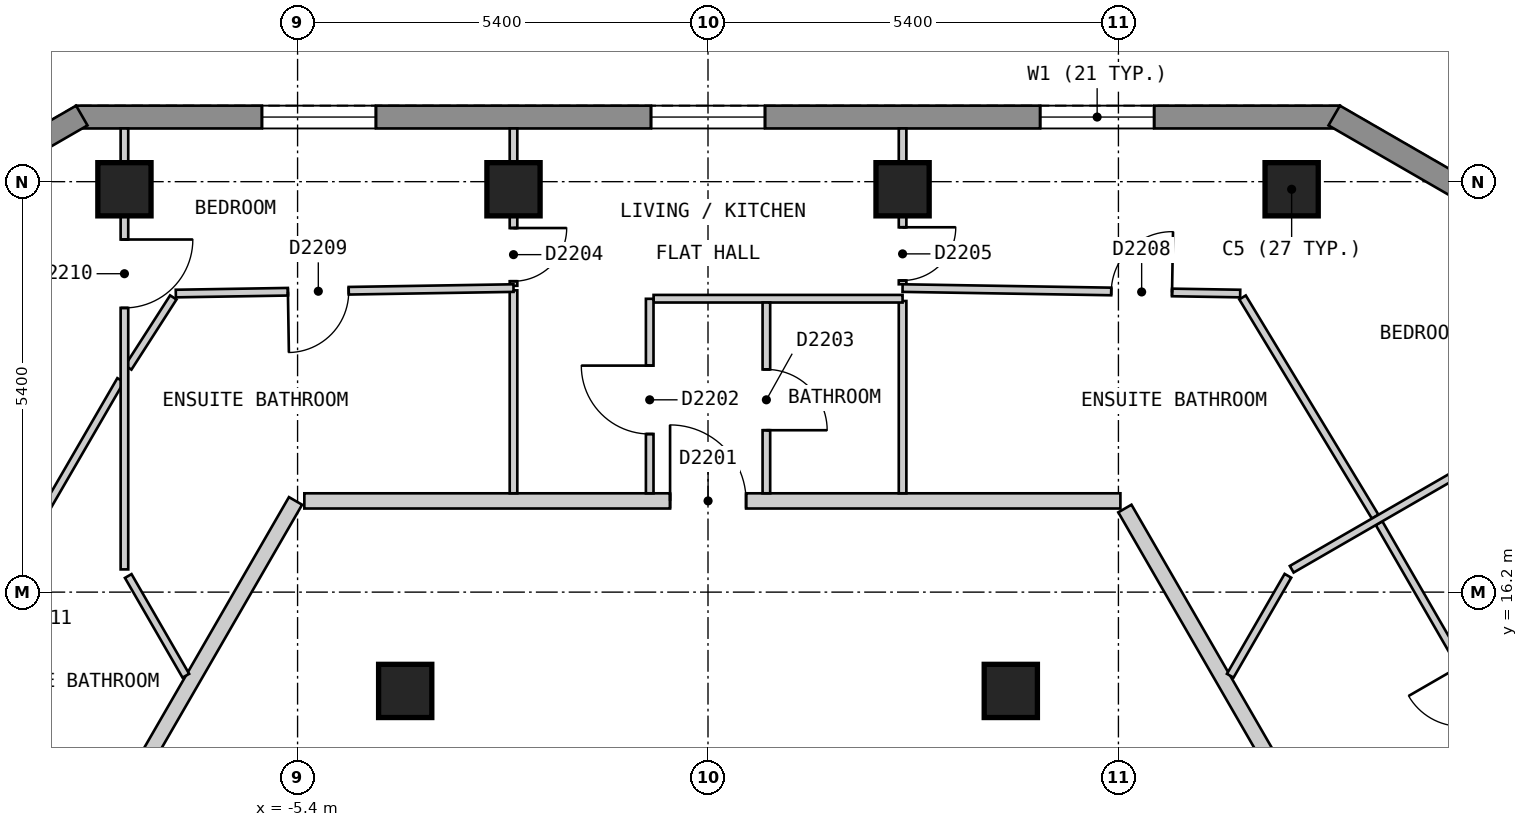
"""IFC4 building model, lengths in metres.
Left out: names, types, materials, properties, quantities, classifications, styles, units other than length and angle.
Written with IfcOpenShell. Run it as: python <this file> out.ifc"""

import sys

from ifc_helpers import new_model, si_unit, direction, frame, frame_2d, origin, origin_2d, place, context, subcontext, project, spatial, polyline, rectangle, outline, extrude, element, fill, save


model = new_model("IFC4")
c1 = context("Model", 3, precision=1e-05, world=origin(), true_north=direction((0.0, 1.0)))
c2 = subcontext(c1, "Body", "Model", "MODEL_VIEW")
j1 = project(units=[si_unit("LENGTHUNIT", "METRE"), si_unit("PLANEANGLEUNIT", "RADIAN")], contexts=[c1])
p1 = place(None, origin())
s1 = spatial("IfcSite", under=j1, at=p1, CompositionType="ELEMENT")
p2 = place(p1, origin())
s2 = spatial("IfcBuilding", under=s1, at=p2, CompositionType="ELEMENT")
p3 = place(p2, frame((0.0, 0.0, 235.8)))
s3 = spatial("IfcBuildingStorey", under=s2, at=p3, CompositionType="ELEMENT", Elevation=235.8)
for number, where, z_axis, x_axis in (
    (1, (7.679, 21.5, 0.0), (0.0, 0.0, 1.0), (-1.0, 0.0, 0.0)),
    (2, (2.56, 21.5, 0.0), (0.0, 0.0, 1.0), (-1.0, 0.0, 0.0)),
    (3, (-2.559, 21.5, 0.0), (0.0, 0.0, 1.0), (-1.0, 0.0, 0.0)),
    (4, (-7.678, 21.5, 0.0), (0.0, 0.0, 1.0), (-1.0, 0.0, 0.0)),
    (5, (3.984, 14.9, 0.0), (0.0, 0.0, 1.0), (1.0, 0.0, 0.0)),
    (6, (-3.984, 14.9, 0.0), (0.0, 0.0, 1.0), (1.0, 0.0, 0.0)),
):
    element("IfcColumn", number, at=place(p3, frame(where, z_axis=z_axis, x_axis=x_axis)), inside=s3, PredefinedType="COLUMN", context=c2, shape_type="SweptSolid", body=[
        extrude(rectangle(XDim=0.7, YDim=0.7, at=origin_2d()), origin(), (0.0, 0.0, 1.0), 3.0),
    ])
p4 = place(p3, frame((8.314, 22.45, 0.0), z_axis=(0.0, 0.0, 1.0), x_axis=(-1.0, 0.0, 0.0)))
e7 = element("IfcWall", 7, at=p4, inside=s3, PredefinedType="SOLIDWALL", context=c2, shape_type="SweptSolid", body=[
    extrude(outline(polyline([(0.0, -0.15), (16.628, -0.15), (16.548, 0.15), (0.08, 0.15), (0.0, -0.15)])), origin(), (0.0, 0.0, 1.0), 2.7),
])
p5 = place(p4, frame((2.444, 0.0, 0.15)))
e8 = element("IfcOpeningElement", 8, at=p5, cuts=e7, PredefinedType="OPENING", context=c2, shape_type="SweptSolid", body=[
    extrude(rectangle(XDim=1.5, YDim=2.1, at=frame_2d((0.75, 1.05))), frame((0.0, 0.16, 0.0), z_axis=(0.0, -1.0, 0.0), x_axis=(1.0, 0.0, 0.0)), (0.0, 0.0, 1.0), 0.32),
])
p6 = place(p4, frame((7.564, 0.0, 0.15)))
e9 = element("IfcOpeningElement", 9, at=p6, cuts=e7, PredefinedType="OPENING", context=c2, shape_type="SweptSolid", body=[
    extrude(rectangle(XDim=1.5, YDim=2.1, at=frame_2d((0.75, 1.05))), frame((0.0, 0.16, 0.0), z_axis=(0.0, -1.0, 0.0), x_axis=(1.0, 0.0, 0.0)), (0.0, 0.0, 1.0), 0.32),
])
p7 = place(p4, frame((12.683, 0.0, 0.15)))
e10 = element("IfcOpeningElement", 10, at=p7, cuts=e7, PredefinedType="OPENING", context=c2, shape_type="SweptSolid", body=[
    extrude(rectangle(XDim=1.5, YDim=2.1, at=frame_2d((0.75, 1.05))), frame((0.0, 0.16, 0.0), z_axis=(0.0, -1.0, 0.0), x_axis=(1.0, 0.0, 0.0)), (0.0, 0.0, 1.0), 0.32),
])
p8 = place(p3, frame((-8.239, 22.47, 0.0), z_axis=(0.0, 0.0, 1.0), x_axis=(-0.866022959057, -0.500004234368, 0.0)))
e11 = element("IfcWall", 11, at=p8, inside=s3, PredefinedType="SOLIDWALL", context=c2, shape_type="SweptSolid", body=[
    extrude(outline(polyline([(0.0, -0.15), (5.0, -0.15), (4.92, 0.15), (0.08, 0.15), (0.0, -0.15)])), origin(), (0.0, 0.0, 1.0), 2.7),
])
p9 = place(p8, frame((0.65, 0.0, 0.15)))
e12 = element("IfcOpeningElement", 12, at=p9, cuts=e11, PredefinedType="OPENING", context=c2, shape_type="SweptSolid", body=[
    extrude(rectangle(XDim=1.2, YDim=2.1, at=frame_2d((0.6, 1.05))), frame((0.0, 0.16, 0.0), z_axis=(0.0, -1.0, 0.0), x_axis=(1.0, 0.0, 0.0)), (0.0, 0.0, 1.0), 0.32),
])
p10 = place(p3, frame((12.569, 19.97, 0.0), z_axis=(0.0, 0.0, 1.0), x_axis=(-0.866022959057, 0.500004234368, 0.0)))
e13 = element("IfcWall", 13, at=p10, inside=s3, PredefinedType="SOLIDWALL", context=c2, shape_type="SweptSolid", body=[
    extrude(outline(polyline([(0.0, -0.15), (5.0, -0.15), (4.92, 0.15), (0.08, 0.15), (0.0, -0.15)])), origin(), (0.0, 0.0, 1.0), 2.7),
])
p11 = place(p10, frame((0.65, 0.0, 0.15)))
e14 = element("IfcOpeningElement", 14, at=p11, cuts=e13, PredefinedType="OPENING", context=c2, shape_type="SweptSolid", body=[
    extrude(rectangle(XDim=1.2, YDim=2.1, at=frame_2d((0.6, 1.05))), frame((0.0, 0.16, 0.0), z_axis=(0.0, -1.0, 0.0), x_axis=(1.0, 0.0, 0.0)), (0.0, 0.0, 1.0), 0.32),
])
p12 = place(p3, frame((5.485, 17.3, 0.0), z_axis=(0.0, 0.0, 1.0), x_axis=(0.500017221754, -0.866015460572, 0.0)))
e15 = element("IfcWall", 15, at=p12, inside=s3, PredefinedType="PARTITIONING", context=c2, shape_type="SweptSolid", body=[
    extrude(rectangle(XDim=10.468, YDim=0.2, at=frame_2d((5.234, 0.0))), origin(), (0.0, 0.0, 1.0), 2.7),
])
p13 = place(p12, frame((9.092, 0.0, 0.0)))
e16 = element("IfcOpeningElement", 16, at=p13, cuts=e15, PredefinedType="OPENING", context=c2, shape_type="SweptSolid", body=[
    extrude(rectangle(XDim=1.0, YDim=2.1, at=frame_2d((0.5, 1.05))), frame((0.0, 0.11, 0.0), z_axis=(0.0, -1.0, 0.0), x_axis=(1.0, 0.0, 0.0)), (0.0, 0.0, 1.0), 0.22),
])
p14 = place(p3, frame((-5.311, 17.4, 0.0), z_axis=(0.0, 0.0, 1.0), x_axis=(1.0, 0.0, 0.0)))
e17 = element("IfcWall", 17, at=p14, inside=s3, PredefinedType="PARTITIONING", context=c2, shape_type="SweptSolid", body=[
    extrude(rectangle(XDim=10.737, YDim=0.2, at=frame_2d((5.369, 0.0))), origin(), (0.0, 0.0, 1.0), 2.7),
])
p15 = place(p14, frame((4.812, 0.0, 0.0)))
e18 = element("IfcOpeningElement", 18, at=p15, cuts=e17, PredefinedType="OPENING", context=c2, shape_type="SweptSolid", body=[
    extrude(rectangle(XDim=1.0, YDim=2.1, at=frame_2d((0.5, 1.05))), frame((0.0, 0.11, 0.0), z_axis=(0.0, -1.0, 0.0), x_axis=(1.0, 0.0, 0.0)), (0.0, 0.0, 1.0), 0.22),
])
p16 = place(p3, frame((-10.854, 8.0, 0.0), z_axis=(0.0, 0.0, 1.0), x_axis=(0.499997637144, 0.866026767976, 0.0)))
e19 = element("IfcWall", 19, at=p16, inside=s3, PredefinedType="PARTITIONING", context=c2, shape_type="SweptSolid", body=[
    extrude(rectangle(XDim=10.854, YDim=0.2, at=frame_2d((5.427, 0.0))), origin(), (0.0, 0.0, 1.0), 2.7),
])
p17 = place(p3, frame((7.033, 20.077, 0.0), z_axis=(0.0, 0.0, 1.0), x_axis=(0.517730137343, -0.855543981854, 0.0)))
e20 = element("IfcWall", 20, at=p17, inside=s3, PredefinedType="PARTITIONING", context=c2, shape_type="SweptSolid", body=[
    extrude(rectangle(XDim=3.371, YDim=0.1, at=frame_2d((1.685, 0.0))), origin(), (0.0, 0.0, 1.0), 2.7),
])
p18 = place(p3, frame((-7.628, 16.412, 0.0), z_axis=(0.0, 0.0, 1.0), x_axis=(0.500159472144, -0.86593331292, 0.0)))
e21 = element("IfcWall", 21, at=p18, inside=s3, PredefinedType="PARTITIONING", context=c2, shape_type="SweptSolid", body=[
    extrude(rectangle(XDim=1.515, YDim=0.1, at=frame_2d((0.758, 0.0))), origin(), (0.0, 0.0, 1.0), 2.7),
])
p19 = place(p3, frame((8.829, 17.107, 0.0), z_axis=(0.0, 0.0, 1.0), x_axis=(0.500035512416, -0.866004899711, 0.0)))
e22 = element("IfcWall", 22, at=p19, inside=s3, PredefinedType="PARTITIONING", context=c2, shape_type="SweptSolid", body=[
    extrude(rectangle(XDim=5.175, YDim=0.1, at=frame_2d((2.588, 0.0))), origin(), (0.0, 0.0, 1.0), 2.7),
])
p20 = place(p19, frame((2.163, 0.0, 0.0)))
e23 = element("IfcOpeningElement", 23, at=p20, cuts=e22, PredefinedType="OPENING", context=c2, shape_type="SweptSolid", body=[
    extrude(rectangle(XDim=0.8, YDim=2.1, at=frame_2d((0.4, 1.05))), frame((0.0, 0.06, 0.0), z_axis=(0.0, -1.0, 0.0), x_axis=(1.0, 0.0, 0.0)), (0.0, 0.0, 1.0), 0.12),
])
p21 = place(p3, frame((-2.559, 20.17, 0.0), z_axis=(0.0, 0.0, 1.0), x_axis=(0.0, -1.0, 0.0)))
e24 = element("IfcWall", 24, at=p21, inside=s3, PredefinedType="PARTITIONING", context=c2, shape_type="SweptSolid", body=[
    extrude(rectangle(XDim=2.67, YDim=0.1, at=frame_2d((1.335, 0.0))), origin(), (0.0, 0.0, 1.0), 2.7),
])
p22 = place(p3, frame((2.56, 22.3, 0.0), z_axis=(0.0, 0.0, 1.0), x_axis=(0.0, -1.0, 0.0)))
e25 = element("IfcWall", 25, at=p22, inside=s3, PredefinedType="PARTITIONING", context=c2, shape_type="SweptSolid", body=[
    extrude(rectangle(XDim=2.05, YDim=0.1, at=frame_2d((1.025, 0.0))), origin(), (0.0, 0.0, 1.0), 2.7),
])
p23 = place(p22, frame((1.3, 0.0, 0.0)))
e26 = element("IfcOpeningElement", 26, at=p23, cuts=e25, PredefinedType="OPENING", context=c2, shape_type="SweptSolid", body=[
    extrude(rectangle(XDim=0.7, YDim=2.1, at=frame_2d((0.35, 1.05))), frame((0.0, 0.06, 0.0), z_axis=(0.0, -1.0, 0.0), x_axis=(1.0, 0.0, 0.0)), (0.0, 0.0, 1.0), 0.12),
])
p24 = place(p3, frame((2.56, 20.03, 0.0), z_axis=(0.0, 0.0, 1.0), x_axis=(0.0, -1.0, 0.0)))
e27 = element("IfcWall", 27, at=p24, inside=s3, PredefinedType="PARTITIONING", context=c2, shape_type="SweptSolid", body=[
    extrude(rectangle(XDim=2.53, YDim=0.1, at=frame_2d((1.265, 0.0))), origin(), (0.0, 0.0, 1.0), 2.7),
])
p25 = place(p3, frame((2.56, 20.2, 0.0), z_axis=(0.0, 0.0, 1.0), x_axis=(0.999868576801, -0.016212005615, 0.0)))
e28 = element("IfcWall", 28, at=p25, inside=s3, PredefinedType="PARTITIONING", context=c2, shape_type="SweptSolid", body=[
    extrude(rectangle(XDim=4.442, YDim=0.1, at=frame_2d((2.221, 0.0))), origin(), (0.0, 0.0, 1.0), 2.7),
])
p26 = place(p25, frame((2.746, 0.0, 0.0)))
e29 = element("IfcOpeningElement", 29, at=p26, cuts=e28, PredefinedType="OPENING", context=c2, shape_type="SweptSolid", body=[
    extrude(rectangle(XDim=0.8, YDim=2.1, at=frame_2d((0.4, 1.05))), frame((0.0, 0.06, 0.0), z_axis=(0.0, -1.0, 0.0), x_axis=(1.0, 0.0, 0.0)), (0.0, 0.0, 1.0), 0.12),
])
p27 = place(p3, frame((-0.716, 20.06, 0.0), z_axis=(0.0, 0.0, 1.0), x_axis=(1.0, 0.0, 0.0)))
e30 = element("IfcWall", 30, at=p27, inside=s3, PredefinedType="PARTITIONING", context=c2, shape_type="SweptSolid", body=[
    extrude(rectangle(XDim=3.276, YDim=0.1, at=frame_2d((1.638, 0.0))), origin(), (0.0, 0.0, 1.0), 2.7),
])
p28 = place(p3, frame((-7.628, 19.154, 0.0), z_axis=(0.0, 0.0, 1.0), x_axis=(0.540600102017, 0.841279697663, 0.0)))
e31 = element("IfcWall", 31, at=p28, inside=s3, PredefinedType="PARTITIONING", context=c2, shape_type="SweptSolid", body=[
    extrude(rectangle(XDim=1.097, YDim=0.1, at=frame_2d((0.548, 0.0))), origin(), (0.0, 0.0, 1.0), 2.7),
])
p29 = place(p3, frame((6.871, 15.1, 0.0), z_axis=(0.0, 0.0, 1.0), x_axis=(0.499805980977, 0.866137391745, 0.0)))
e32 = element("IfcWall", 32, at=p29, inside=s3, PredefinedType="PARTITIONING", context=c2, shape_type="SweptSolid", body=[
    extrude(rectangle(XDim=1.518, YDim=0.1, at=frame_2d((0.759, 0.0))), origin(), (0.0, 0.0, 1.0), 2.7),
])
p30 = place(p3, frame((-11.367, 12.712, 0.0), z_axis=(0.0, 0.0, 1.0), x_axis=(0.501473866443, 0.865172792727, 0.0)))
e33 = element("IfcWall", 33, at=p30, inside=s3, PredefinedType="PARTITIONING", context=c2, shape_type="SweptSolid", body=[
    extrude(rectangle(XDim=7.256, YDim=0.1, at=frame_2d((3.628, 0.0))), origin(), (0.0, 0.0, 1.0), 2.7),
])
p31 = place(p30, frame((3.228, 0.0, 0.0)))
e34 = element("IfcOpeningElement", 34, at=p31, cuts=e33, PredefinedType="OPENING", context=c2, shape_type="SweptSolid", body=[
    extrude(rectangle(XDim=0.8, YDim=2.1, at=frame_2d((0.4, 1.05))), frame((0.0, 0.06, 0.0), z_axis=(0.0, -1.0, 0.0), x_axis=(1.0, 0.0, 0.0)), (0.0, 0.0, 1.0), 0.12),
])
p32 = place(p3, frame((0.768, 17.5, 0.0), z_axis=(0.0, 0.0, 1.0), x_axis=(0.0, 1.0, 0.0)))
e35 = element("IfcWall", 35, at=p32, inside=s3, PredefinedType="PARTITIONING", context=c2, shape_type="SweptSolid", body=[
    extrude(rectangle(XDim=2.51, YDim=0.1, at=frame_2d((1.255, 0.0))), origin(), (0.0, 0.0, 1.0), 2.7),
])
p33 = place(p32, frame((0.83, 0.0, 0.0)))
e36 = element("IfcOpeningElement", 36, at=p33, cuts=e35, PredefinedType="OPENING", context=c2, shape_type="SweptSolid", body=[
    extrude(rectangle(XDim=0.8, YDim=2.1, at=frame_2d((0.4, 1.05))), frame((0.0, 0.06, 0.0), z_axis=(0.0, -1.0, 0.0), x_axis=(1.0, 0.0, 0.0)), (0.0, 0.0, 1.0), 0.12),
])
p34 = place(p3, frame((-7.678, 16.499, 0.0), z_axis=(0.0, 0.0, 1.0), x_axis=(0.0, 1.0, 0.0)))
e37 = element("IfcWall", 37, at=p34, inside=s3, PredefinedType="PARTITIONING", context=c2, shape_type="SweptSolid", body=[
    extrude(rectangle(XDim=5.801, YDim=0.1, at=frame_2d((2.9, 0.0))), origin(), (0.0, 0.0, 1.0), 2.7),
])
p35 = place(p34, frame((3.44, 0.0, 0.0)))
e38 = element("IfcOpeningElement", 38, at=p35, cuts=e37, PredefinedType="OPENING", context=c2, shape_type="SweptSolid", body=[
    extrude(rectangle(XDim=0.9, YDim=2.1, at=frame_2d((0.45, 1.05))), frame((0.0, 0.06, 0.0), z_axis=(0.0, -1.0, 0.0), x_axis=(1.0, 0.0, 0.0)), (0.0, 0.0, 1.0), 0.12),
])
p36 = place(p3, frame((-0.767, 17.5, 0.0), z_axis=(0.0, 0.0, 1.0), x_axis=(0.0, 1.0, 0.0)))
e39 = element("IfcWall", 39, at=p36, inside=s3, PredefinedType="PARTITIONING", context=c2, shape_type="SweptSolid", body=[
    extrude(rectangle(XDim=2.559, YDim=0.1, at=frame_2d((1.28, 0.0))), origin(), (0.0, 0.0, 1.0), 2.7),
])
p37 = place(p36, frame((0.78, 0.0, 0.0)))
e40 = element("IfcOpeningElement", 40, at=p37, cuts=e39, PredefinedType="OPENING", context=c2, shape_type="SweptSolid", body=[
    extrude(rectangle(XDim=0.9, YDim=2.1, at=frame_2d((0.45, 1.05))), frame((0.0, 0.06, 0.0), z_axis=(0.0, -1.0, 0.0), x_axis=(1.0, 0.0, 0.0)), (0.0, 0.0, 1.0), 0.12),
])
p38 = place(p3, frame((-2.559, 20.23, 0.0), z_axis=(0.0, 0.0, 1.0), x_axis=(0.0, 1.0, 0.0)))
e41 = element("IfcWall", 41, at=p38, inside=s3, PredefinedType="PARTITIONING", context=c2, shape_type="SweptSolid", body=[
    extrude(rectangle(XDim=2.07, YDim=0.1, at=frame_2d((1.035, 0.0))), origin(), (0.0, 0.0, 1.0), 2.7),
])
p39 = place(p38, frame((0.06, 0.0, 0.0)))
e42 = element("IfcOpeningElement", 42, at=p39, cuts=e41, PredefinedType="OPENING", context=c2, shape_type="SweptSolid", body=[
    extrude(rectangle(XDim=0.7, YDim=2.1, at=frame_2d((0.35, 1.05))), frame((0.0, 0.06, 0.0), z_axis=(0.0, -1.0, 0.0), x_axis=(1.0, 0.0, 0.0)), (0.0, 0.0, 1.0), 0.12),
])
p40 = place(p3, frame((-7.002, 20.128, 0.0), z_axis=(0.0, 0.0, 1.0), x_axis=(0.999868634558, 0.016208443081, 0.0)))
e43 = element("IfcWall", 43, at=p40, inside=s3, PredefinedType="PARTITIONING", context=c2, shape_type="SweptSolid", body=[
    extrude(rectangle(XDim=4.443, YDim=0.1, at=frame_2d((2.222, 0.0))), origin(), (0.0, 0.0, 1.0), 2.7),
])
p41 = place(p40, frame((1.475, 0.0, 0.0)))
e44 = element("IfcOpeningElement", 44, at=p41, cuts=e43, PredefinedType="OPENING", context=c2, shape_type="SweptSolid", body=[
    extrude(rectangle(XDim=0.8, YDim=2.1, at=frame_2d((0.4, 1.05))), frame((0.0, 0.06, 0.0), z_axis=(0.0, -1.0, 0.0), x_axis=(1.0, 0.0, 0.0)), (0.0, 0.0, 1.0), 0.12),
])
p42 = place(p3, frame((7.68, 16.501, 0.0), z_axis=(0.0, 0.0, 1.0), x_axis=(0.86602149507, 0.500006770031, 0.0)))
e45 = element("IfcWall", 45, at=p42, inside=s3, PredefinedType="PARTITIONING", context=c2, shape_type="SweptSolid", body=[
    extrude(rectangle(XDim=5.798, YDim=0.1, at=frame_2d((2.899, 0.0))), origin(), (0.0, 0.0, 1.0), 2.7),
])
p43 = place(p42, frame((3.098, 0.0, 0.0)))
e46 = element("IfcOpeningElement", 46, at=p43, cuts=e45, PredefinedType="OPENING", context=c2, shape_type="SweptSolid", body=[
    extrude(rectangle(XDim=0.9, YDim=2.1, at=frame_2d((0.45, 1.05))), frame((0.0, 0.06, 0.0), z_axis=(0.0, -1.0, 0.0), x_axis=(1.0, 0.0, 0.0)), (0.0, 0.0, 1.0), 0.12),
])
p44 = place(p3, frame((9.079, 11.275, 0.0), z_axis=(0.0, 0.0, 1.0), x_axis=(0.866001485781, 0.500041424909, 0.0)))
e47 = element("IfcWall", 47, at=p44, inside=s3, PredefinedType="PARTITIONING", context=c2, shape_type="SweptSolid", body=[
    extrude(rectangle(XDim=7.2, YDim=0.2, at=frame_2d((3.6, 0.0))), origin(), (0.0, 0.0, 1.0), 2.7),
])
p45 = place(p5, origin())
e48 = element("IfcWindow", 48, at=p45, inside=s3, PartitioningType="SINGLE_PANEL", PredefinedType="WINDOW", context=c2, shape_type="SweptSolid", body=[
    extrude(rectangle(XDim=1.5, YDim=2.1, at=frame_2d((0.75, 1.05))), frame((0.0, 0.03, 0.0), z_axis=(0.0, -1.0, 0.0), x_axis=(1.0, 0.0, 0.0)), (0.0, 0.0, 1.0), 0.06),
])
fill(e8, e48)
p46 = place(p6, origin())
e49 = element("IfcWindow", 49, at=p46, inside=s3, PartitioningType="SINGLE_PANEL", PredefinedType="WINDOW", context=c2, shape_type="SweptSolid", body=[
    extrude(rectangle(XDim=1.5, YDim=2.1, at=frame_2d((0.75, 1.05))), frame((0.0, 0.03, 0.0), z_axis=(0.0, -1.0, 0.0), x_axis=(1.0, 0.0, 0.0)), (0.0, 0.0, 1.0), 0.06),
])
fill(e9, e49)
p47 = place(p7, origin())
e50 = element("IfcWindow", 50, at=p47, inside=s3, PartitioningType="SINGLE_PANEL", PredefinedType="WINDOW", context=c2, shape_type="SweptSolid", body=[
    extrude(rectangle(XDim=1.5, YDim=2.1, at=frame_2d((0.75, 1.05))), frame((0.0, 0.03, 0.0), z_axis=(0.0, -1.0, 0.0), x_axis=(1.0, 0.0, 0.0)), (0.0, 0.0, 1.0), 0.06),
])
fill(e10, e50)
p48 = place(p15, origin())
e51 = element("IfcDoor", 51, at=p48, inside=s3, OperationType="SINGLE_SWING_LEFT", PredefinedType="DOOR", context=c2, shape_type="SweptSolid", body=[
    extrude(rectangle(XDim=1.0, YDim=2.1, at=frame_2d((0.5, 1.05))), frame((0.0, 0.025, 0.0), z_axis=(0.0, -1.0, 0.0), x_axis=(1.0, 0.0, 0.0)), (0.0, 0.0, 1.0), 0.05),
])
fill(e18, e51)
p49 = place(p37, origin())
e52 = element("IfcDoor", 52, at=p49, inside=s3, OperationType="SINGLE_SWING_RIGHT", PredefinedType="DOOR", context=c2, shape_type="SweptSolid", body=[
    extrude(rectangle(XDim=0.9, YDim=2.1, at=frame_2d((0.45, 1.05))), frame((0.0, 0.025, 0.0), z_axis=(0.0, -1.0, 0.0), x_axis=(1.0, 0.0, 0.0)), (0.0, 0.0, 1.0), 0.05),
])
fill(e40, e52)
p50 = place(p33, origin())
e53 = element("IfcDoor", 53, at=p50, inside=s3, OperationType="SINGLE_SWING_LEFT", PredefinedType="DOOR", context=c2, shape_type="SweptSolid", body=[
    extrude(rectangle(XDim=0.8, YDim=2.1, at=frame_2d((0.4, 1.05))), frame((0.0, 0.025, 0.0), z_axis=(0.0, -1.0, 0.0), x_axis=(1.0, 0.0, 0.0)), (0.0, 0.0, 1.0), 0.05),
])
fill(e36, e53)
p51 = place(p39, origin())
e54 = element("IfcDoor", 54, at=p51, inside=s3, OperationType="SINGLE_SWING_RIGHT", PredefinedType="DOOR", context=c2, shape_type="SweptSolid", body=[
    extrude(rectangle(XDim=0.7, YDim=2.1, at=frame_2d((0.35, 1.05))), frame((0.0, 0.025, 0.0), z_axis=(0.0, -1.0, 0.0), x_axis=(1.0, 0.0, 0.0)), (0.0, 0.0, 1.0), 0.05),
])
fill(e42, e54)
p52 = place(p23, origin())
e55 = element("IfcDoor", 55, at=p52, inside=s3, OperationType="SINGLE_SWING_LEFT", PredefinedType="DOOR", context=c2, shape_type="SweptSolid", body=[
    extrude(rectangle(XDim=0.7, YDim=2.1, at=frame_2d((0.35, 1.05))), frame((0.0, 0.025, 0.0), z_axis=(0.0, -1.0, 0.0), x_axis=(1.0, 0.0, 0.0)), (0.0, 0.0, 1.0), 0.05),
])
fill(e26, e55)
p53 = place(p26, origin())
e56 = element("IfcDoor", 56, at=p53, inside=s3, OperationType="SINGLE_SWING_RIGHT", PredefinedType="DOOR", context=c2, shape_type="SweptSolid", body=[
    extrude(rectangle(XDim=0.8, YDim=2.1, at=frame_2d((0.4, 1.05))), frame((0.0, 0.025, 0.0), z_axis=(0.0, -1.0, 0.0), x_axis=(1.0, 0.0, 0.0)), (0.0, 0.0, 1.0), 0.05),
])
fill(e29, e56)
p54 = place(p41, origin())
e57 = element("IfcDoor", 57, at=p54, inside=s3, OperationType="SINGLE_SWING_LEFT", PredefinedType="DOOR", context=c2, shape_type="SweptSolid", body=[
    extrude(rectangle(XDim=0.8, YDim=2.1, at=frame_2d((0.4, 1.05))), frame((0.0, 0.025, 0.0), z_axis=(0.0, -1.0, 0.0), x_axis=(1.0, 0.0, 0.0)), (0.0, 0.0, 1.0), 0.05),
])
fill(e44, e57)
p55 = place(p35, origin())
e58 = element("IfcDoor", 58, at=p55, inside=s3, OperationType="SINGLE_SWING_RIGHT", PredefinedType="DOOR", context=c2, shape_type="SweptSolid", body=[
    extrude(rectangle(XDim=0.9, YDim=2.1, at=frame_2d((0.45, 1.05))), frame((0.0, 0.025, 0.0), z_axis=(0.0, -1.0, 0.0), x_axis=(1.0, 0.0, 0.0)), (0.0, 0.0, 1.0), 0.05),
])
fill(e38, e58)
save(model, sys.argv[1])
